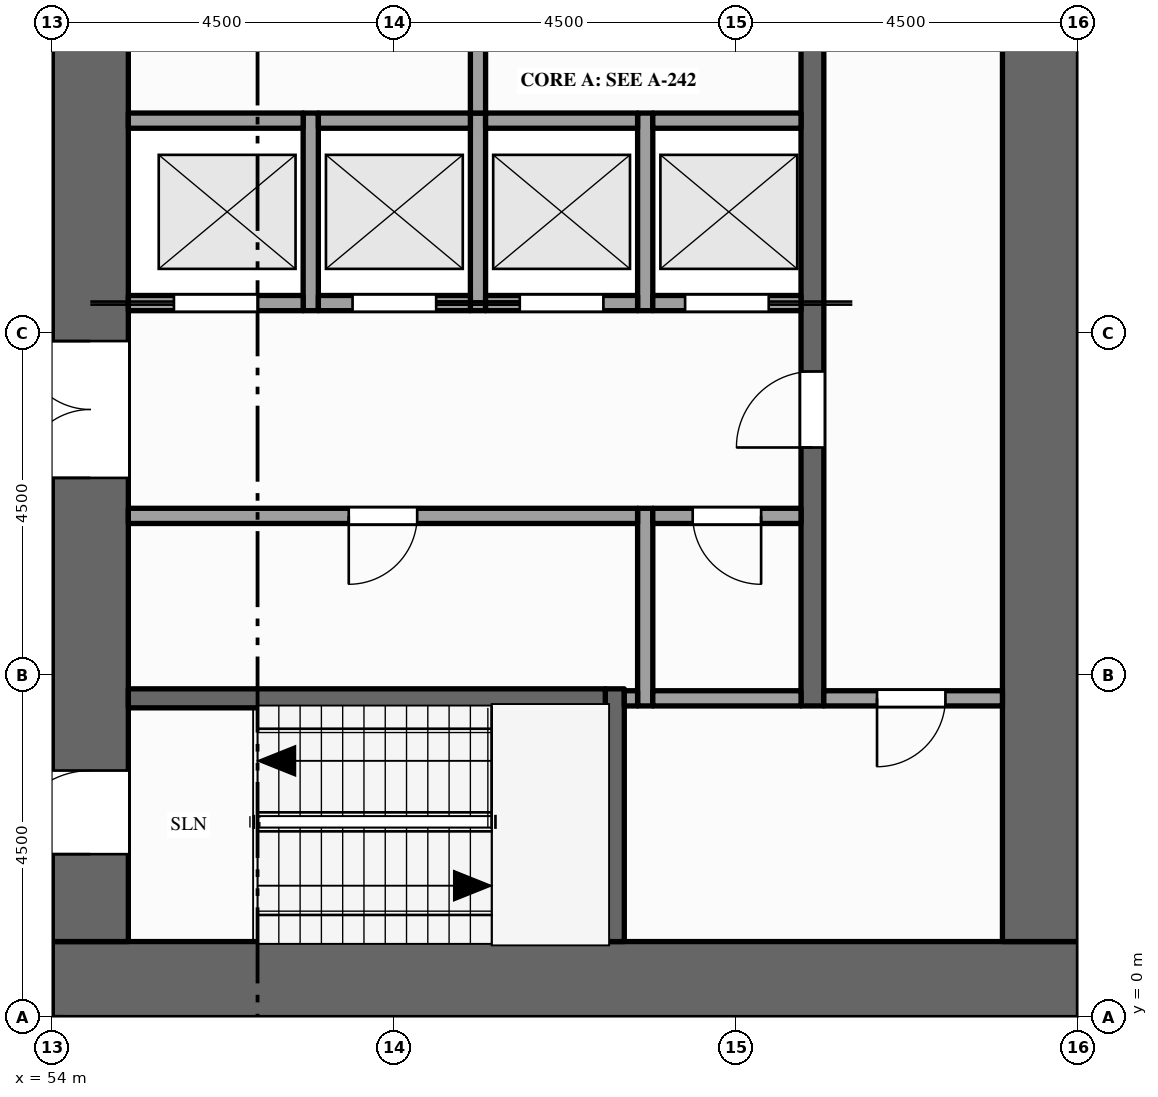
"""IFC4 building model, lengths in metres.
Left out: names, types, materials, properties, quantities, classifications, styles, units other than length and angle.
Written with IfcOpenShell. Run it as: python <this file> out.ifc"""

import sys

from ifc_helpers import new_model, si_unit, direction, frame, frame_2d, origin, place, context, subcontext, project, spatial, rectangle, extrude, element, fill, save


model = new_model("IFC4")
c1 = context("Model", 3, precision=1e-05, world=origin(), true_north=direction((0.0, 1.0)))
c2 = subcontext(c1, "Body", "Model", "MODEL_VIEW")
j1 = project(units=[si_unit("LENGTHUNIT", "METRE"), si_unit("PLANEANGLEUNIT", "RADIAN")], contexts=[c1])
p1 = place(None, origin())
s1 = spatial("IfcSite", under=j1, at=p1, CompositionType="ELEMENT")
p2 = place(p1, origin())
s2 = spatial("IfcBuilding", under=s1, at=p2, CompositionType="ELEMENT")
p3 = place(p2, frame((0.0, 0.0, 235.0)))
s3 = spatial("IfcBuildingStorey", under=s2, at=p3, CompositionType="ELEMENT", Elevation=235.0)
p4 = place(p3, frame((67.5, 0.5, -0.15), z_axis=(0.0, 0.0, 1.0), x_axis=(-1.0, 0.0, 0.0)))
e1 = element("IfcWall", 1, at=p4, inside=s3, PredefinedType="SHEAR", context=c2, shape_type="SweptSolid", body=[
    extrude(rectangle(XDim=13.5, YDim=1.0, at=frame_2d((6.75, 0.0))), origin(), (0.0, 0.0, 1.0), 4.0),
])
p5 = place(p3, frame((54.5, 1.0, -0.15), z_axis=(0.0, 0.0, 1.0), x_axis=(0.0, 1.0, 0.0)))
e2 = element("IfcWall", 2, at=p5, inside=s3, PredefinedType="SHEAR", context=c2, shape_type="SweptSolid", body=[
    extrude(rectangle(XDim=20.5, YDim=1.0, at=frame_2d((10.25, 0.0))), origin(), (0.0, 0.0, 1.0), 4.0),
])
p6 = place(p5, frame((6.1, 0.0, 0.15)))
e3 = element("IfcOpeningElement", 3, at=p6, cuts=e2, PredefinedType="OPENING", context=c2, shape_type="SweptSolid", body=[
    extrude(rectangle(XDim=1.8, YDim=2.1, at=frame_2d((0.9, 1.05))), frame((0.0, 0.51, 0.0), z_axis=(0.0, -1.0, 0.0), x_axis=(1.0, 0.0, 0.0)), (0.0, 0.0, 1.0), 1.02),
])
p7 = place(p5, frame((12.15, 0.0, 0.15)))
e4 = element("IfcOpeningElement", 4, at=p7, cuts=e2, PredefinedType="OPENING", context=c2, shape_type="SweptSolid", body=[
    extrude(rectangle(XDim=1.1, YDim=2.1, at=frame_2d((0.55, 1.05))), frame((0.0, 0.51, 0.0), z_axis=(0.0, -1.0, 0.0), x_axis=(1.0, 0.0, 0.0)), (0.0, 0.0, 1.0), 1.02),
])
p8 = place(p5, frame((1.15, 0.0, 0.15)))
e5 = element("IfcOpeningElement", 5, at=p8, cuts=e2, PredefinedType="OPENING", context=c2, shape_type="SweptSolid", body=[
    extrude(rectangle(XDim=1.1, YDim=2.1, at=frame_2d((0.55, 1.05))), frame((0.0, 0.51, 0.0), z_axis=(0.0, -1.0, 0.0), x_axis=(1.0, 0.0, 0.0)), (0.0, 0.0, 1.0), 1.02),
])
p9 = place(p5, frame((18.35, 0.0, 0.15)))
e6 = element("IfcOpeningElement", 6, at=p9, cuts=e2, PredefinedType="OPENING", context=c2, shape_type="SweptSolid", body=[
    extrude(rectangle(XDim=1.1, YDim=2.1, at=frame_2d((0.55, 1.05))), frame((0.0, 0.51, 0.0), z_axis=(0.0, -1.0, 0.0), x_axis=(1.0, 0.0, 0.0)), (0.0, 0.0, 1.0), 1.02),
])
p10 = place(p3, frame((67.0, 1.0, -0.15), z_axis=(0.0, 0.0, 1.0), x_axis=(0.0, 1.0, 0.0)))
e7 = element("IfcWall", 7, at=p10, inside=s3, PredefinedType="SHEAR", context=c2, shape_type="SweptSolid", body=[
    extrude(rectangle(XDim=20.5, YDim=1.0, at=frame_2d((10.25, 0.0))), origin(), (0.0, 0.0, 1.0), 4.0),
])
for number, where, z_axis, x_axis in (
    (8, (57.4, 9.3, 0.0), (0.0, 0.0, 1.0), (0.0, 1.0, 0.0)),
    (9, (59.6, 9.3, 0.0), (0.0, 0.0, 1.0), (0.0, 1.0, 0.0)),
):
    element("IfcWall", number, at=place(p3, frame(where, z_axis=z_axis, x_axis=x_axis)), inside=s3, PredefinedType="SOLIDWALL", context=c2, shape_type="SweptSolid", body=[
        extrude(rectangle(XDim=2.6, YDim=0.2, at=frame_2d((1.3, 0.0))), origin(), (0.0, 0.0, 1.0), 3.85),
    ])
p11 = place(p3, frame((59.6, 11.9, 0.0), z_axis=(0.0, 0.0, 1.0), x_axis=(0.0, 1.0, 0.0)))
e10 = element("IfcWall", 10, at=p11, inside=s3, PredefinedType="PARTITIONING", context=c2, shape_type="SweptSolid", body=[
    extrude(rectangle(XDim=3.6, YDim=0.2, at=frame_2d((1.8, 0.0))), origin(), (0.0, 0.0, 1.0), 3.85),
])
p12 = place(p11, frame((1.3, 0.0, 0.0)))
e11 = element("IfcOpeningElement", 11, at=p12, cuts=e10, PredefinedType="OPENING", context=c2, shape_type="SweptSolid", body=[
    extrude(rectangle(XDim=1.0, YDim=2.1, at=frame_2d((0.5, 1.05))), frame((0.0, 0.11, 0.0), z_axis=(0.0, -1.0, 0.0), x_axis=(1.0, 0.0, 0.0)), (0.0, 0.0, 1.0), 0.22),
])
p13 = place(p3, frame((61.4, 1.0, 0.0), z_axis=(0.0, 0.0, 1.0), x_axis=(0.0, 1.0, 0.0)))
e12 = element("IfcWall", 12, at=p13, inside=s3, PredefinedType="SHEAR", context=c2, shape_type="SweptSolid", body=[
    extrude(rectangle(XDim=3.325, YDim=0.25, at=frame_2d((1.663, 0.0))), origin(), (0.0, 0.0, 1.0), 3.85),
])
p14 = place(p3, frame((61.8, 4.1, 0.0), z_axis=(0.0, 0.0, 1.0), x_axis=(0.0, 1.0, 0.0)))
e13 = element("IfcWall", 13, at=p14, inside=s3, PredefinedType="PARTITIONING", context=c2, shape_type="SweptSolid", body=[
    extrude(rectangle(XDim=2.6, YDim=0.2, at=frame_2d((1.3, 0.0))), origin(), (0.0, 0.0, 1.0), 3.85),
])
p15 = place(p3, frame((61.8, 9.3, 0.0), z_axis=(0.0, 0.0, 1.0), x_axis=(0.0, 1.0, 0.0)))
e14 = element("IfcWall", 14, at=p15, inside=s3, PredefinedType="SOLIDWALL", context=c2, shape_type="SweptSolid", body=[
    extrude(rectangle(XDim=2.6, YDim=0.2, at=frame_2d((1.3, 0.0))), origin(), (0.0, 0.0, 1.0), 3.85),
])
p16 = place(p3, frame((64.0, 4.1, 0.0), z_axis=(0.0, 0.0, 1.0), x_axis=(0.0, 1.0, 0.0)))
e15 = element("IfcWall", 15, at=p16, inside=s3, PredefinedType="SHEAR", context=c2, shape_type="SweptSolid", body=[
    extrude(rectangle(XDim=14.5, YDim=0.3, at=frame_2d((7.25, 0.0))), origin(), (0.0, 0.0, 1.0), 3.85),
])
p17 = place(p16, frame((3.4, 0.0, 0.0)))
e16 = element("IfcOpeningElement", 16, at=p17, cuts=e15, PredefinedType="OPENING", context=c2, shape_type="SweptSolid", body=[
    extrude(rectangle(XDim=1.0, YDim=2.1, at=frame_2d((0.5, 1.05))), frame((0.0, 0.16, 0.0), z_axis=(0.0, -1.0, 0.0), x_axis=(1.0, 0.0, 0.0)), (0.0, 0.0, 1.0), 0.32),
])
p18 = place(p16, frame((9.1, 0.0, 0.0)))
e17 = element("IfcOpeningElement", 17, at=p18, cuts=e15, PredefinedType="OPENING", context=c2, shape_type="SweptSolid", body=[
    extrude(rectangle(XDim=1.0, YDim=2.1, at=frame_2d((0.5, 1.05))), frame((0.0, 0.16, 0.0), z_axis=(0.0, -1.0, 0.0), x_axis=(1.0, 0.0, 0.0)), (0.0, 0.0, 1.0), 0.32),
])
p19 = place(p3, frame((55.0, 4.2, 0.0), z_axis=(0.0, 0.0, 1.0), x_axis=(1.0, 0.0, 0.0)))
e18 = element("IfcWall", 18, at=p19, inside=s3, PredefinedType="SHEAR", context=c2, shape_type="SweptSolid", body=[
    extrude(rectangle(XDim=6.275, YDim=0.25, at=frame_2d((3.137, 0.0))), origin(), (0.0, 0.0, 1.0), 3.85),
])
p20 = place(p3, frame((61.525, 4.2, 0.0), z_axis=(0.0, 0.0, 1.0), x_axis=(1.0, 0.0, 0.0)))
e19 = element("IfcWall", 19, at=p20, inside=s3, PredefinedType="PARTITIONING", context=c2, shape_type="SweptSolid", body=[
    extrude(rectangle(XDim=0.175, YDim=0.2, at=frame_2d((0.087, 0.0))), origin(), (0.0, 0.0, 1.0), 3.85),
])
p21 = place(p3, frame((61.9, 4.2, 0.0), z_axis=(0.0, 0.0, 1.0), x_axis=(1.0, 0.0, 0.0)))
e20 = element("IfcWall", 20, at=p21, inside=s3, PredefinedType="PARTITIONING", context=c2, shape_type="SweptSolid", body=[
    extrude(rectangle(XDim=1.95, YDim=0.2, at=frame_2d((0.975, 0.0))), origin(), (0.0, 0.0, 1.0), 3.85),
])
p22 = place(p3, frame((64.15, 4.2, 0.0), z_axis=(0.0, 0.0, 1.0), x_axis=(1.0, 0.0, 0.0)))
e21 = element("IfcWall", 21, at=p22, inside=s3, PredefinedType="PARTITIONING", context=c2, shape_type="SweptSolid", body=[
    extrude(rectangle(XDim=2.35, YDim=0.2, at=frame_2d((1.175, 0.0))), origin(), (0.0, 0.0, 1.0), 3.85),
])
p23 = place(p22, frame((0.7, 0.0, 0.0)))
e22 = element("IfcOpeningElement", 22, at=p23, cuts=e21, PredefinedType="OPENING", context=c2, shape_type="SweptSolid", body=[
    extrude(rectangle(XDim=0.9, YDim=2.1, at=frame_2d((0.45, 1.05))), frame((0.0, 0.11, 0.0), z_axis=(0.0, -1.0, 0.0), x_axis=(1.0, 0.0, 0.0)), (0.0, 0.0, 1.0), 0.22),
])
p24 = place(p3, frame((55.0, 6.6, 0.0), z_axis=(0.0, 0.0, 1.0), x_axis=(1.0, 0.0, 0.0)))
e23 = element("IfcWall", 23, at=p24, inside=s3, PredefinedType="PARTITIONING", context=c2, shape_type="SweptSolid", body=[
    extrude(rectangle(XDim=6.7, YDim=0.2, at=frame_2d((3.35, 0.0))), origin(), (0.0, 0.0, 1.0), 3.85),
])
p25 = place(p24, frame((2.9, 0.0, 0.0)))
e24 = element("IfcOpeningElement", 24, at=p25, cuts=e23, PredefinedType="OPENING", context=c2, shape_type="SweptSolid", body=[
    extrude(rectangle(XDim=0.9, YDim=2.1, at=frame_2d((0.45, 1.05))), frame((0.0, 0.11, 0.0), z_axis=(0.0, -1.0, 0.0), x_axis=(1.0, 0.0, 0.0)), (0.0, 0.0, 1.0), 0.22),
])
p26 = place(p3, frame((61.9, 6.6, 0.0), z_axis=(0.0, 0.0, 1.0), x_axis=(1.0, 0.0, 0.0)))
e25 = element("IfcWall", 25, at=p26, inside=s3, PredefinedType="PARTITIONING", context=c2, shape_type="SweptSolid", body=[
    extrude(rectangle(XDim=1.95, YDim=0.2, at=frame_2d((0.975, 0.0))), origin(), (0.0, 0.0, 1.0), 3.85),
])
p27 = place(p26, frame((0.525, 0.0, 0.0)))
e26 = element("IfcOpeningElement", 26, at=p27, cuts=e25, PredefinedType="OPENING", context=c2, shape_type="SweptSolid", body=[
    extrude(rectangle(XDim=0.9, YDim=2.1, at=frame_2d((0.45, 1.05))), frame((0.0, 0.11, 0.0), z_axis=(0.0, -1.0, 0.0), x_axis=(1.0, 0.0, 0.0)), (0.0, 0.0, 1.0), 0.22),
])
p28 = place(p3, frame((55.0, 9.4, 0.0), z_axis=(0.0, 0.0, 1.0), x_axis=(1.0, 0.0, 0.0)))
e27 = element("IfcWall", 27, at=p28, inside=s3, PredefinedType="SOLIDWALL", context=c2, shape_type="SweptSolid", body=[
    extrude(rectangle(XDim=2.3, YDim=0.2, at=frame_2d((1.15, 0.0))), origin(), (0.0, 0.0, 1.0), 3.85),
])
p29 = place(p28, frame((0.6, 0.0, 0.012)))
e28 = element("IfcOpeningElement", 28, at=p29, cuts=e27, PredefinedType="OPENING", context=c2, shape_type="SweptSolid", body=[
    extrude(rectangle(XDim=1.1, YDim=2.1, at=frame_2d((0.55, 1.05))), frame((0.0, 0.11, 0.0), z_axis=(0.0, -1.0, 0.0), x_axis=(1.0, 0.0, 0.0)), (0.0, 0.0, 1.0), 0.22),
])
p30 = place(p3, frame((57.5, 9.4, 0.0), z_axis=(0.0, 0.0, 1.0), x_axis=(1.0, 0.0, 0.0)))
e29 = element("IfcWall", 29, at=p30, inside=s3, PredefinedType="SOLIDWALL", context=c2, shape_type="SweptSolid", body=[
    extrude(rectangle(XDim=2.0, YDim=0.2, at=frame_2d((1.0, 0.0))), origin(), (0.0, 0.0, 1.0), 3.85),
])
p31 = place(p30, frame((0.45, 0.0, 0.012)))
e30 = element("IfcOpeningElement", 30, at=p31, cuts=e29, PredefinedType="OPENING", context=c2, shape_type="SweptSolid", body=[
    extrude(rectangle(XDim=1.1, YDim=2.1, at=frame_2d((0.55, 1.05))), frame((0.0, 0.11, 0.0), z_axis=(0.0, -1.0, 0.0), x_axis=(1.0, 0.0, 0.0)), (0.0, 0.0, 1.0), 0.22),
])
p32 = place(p3, frame((59.7, 9.4, 0.0), z_axis=(0.0, 0.0, 1.0), x_axis=(1.0, 0.0, 0.0)))
e31 = element("IfcWall", 31, at=p32, inside=s3, PredefinedType="SOLIDWALL", context=c2, shape_type="SweptSolid", body=[
    extrude(rectangle(XDim=2.0, YDim=0.2, at=frame_2d((1.0, 0.0))), origin(), (0.0, 0.0, 1.0), 3.85),
])
p33 = place(p32, frame((0.45, 0.0, 0.012)))
e32 = element("IfcOpeningElement", 32, at=p33, cuts=e31, PredefinedType="OPENING", context=c2, shape_type="SweptSolid", body=[
    extrude(rectangle(XDim=1.1, YDim=2.1, at=frame_2d((0.55, 1.05))), frame((0.0, 0.11, 0.0), z_axis=(0.0, -1.0, 0.0), x_axis=(1.0, 0.0, 0.0)), (0.0, 0.0, 1.0), 0.22),
])
p34 = place(p3, frame((61.9, 9.4, 0.0), z_axis=(0.0, 0.0, 1.0), x_axis=(1.0, 0.0, 0.0)))
e33 = element("IfcWall", 33, at=p34, inside=s3, PredefinedType="SOLIDWALL", context=c2, shape_type="SweptSolid", body=[
    extrude(rectangle(XDim=1.95, YDim=0.2, at=frame_2d((0.975, 0.0))), origin(), (0.0, 0.0, 1.0), 3.85),
])
p35 = place(p34, frame((0.425, 0.0, 0.012)))
e34 = element("IfcOpeningElement", 34, at=p35, cuts=e33, PredefinedType="OPENING", context=c2, shape_type="SweptSolid", body=[
    extrude(rectangle(XDim=1.1, YDim=2.1, at=frame_2d((0.55, 1.05))), frame((0.0, 0.11, 0.0), z_axis=(0.0, -1.0, 0.0), x_axis=(1.0, 0.0, 0.0)), (0.0, 0.0, 1.0), 0.22),
])
p36 = place(p3, frame((55.0, 11.8, 0.0), z_axis=(0.0, 0.0, 1.0), x_axis=(1.0, 0.0, 0.0)))
e35 = element("IfcWall", 35, at=p36, inside=s3, PredefinedType="SOLIDWALL", context=c2, shape_type="SweptSolid", body=[
    extrude(rectangle(XDim=2.3, YDim=0.2, at=frame_2d((1.15, 0.0))), origin(), (0.0, 0.0, 1.0), 3.85),
])
for number, where, z_axis, x_axis in (
    (36, (57.5, 11.8, 0.0), (0.0, 0.0, 1.0), (1.0, 0.0, 0.0)),
    (37, (59.7, 11.8, 0.0), (0.0, 0.0, 1.0), (1.0, 0.0, 0.0)),
):
    element("IfcWall", number, at=place(p3, frame(where, z_axis=z_axis, x_axis=x_axis)), inside=s3, PredefinedType="SOLIDWALL", context=c2, shape_type="SweptSolid", body=[
        extrude(rectangle(XDim=2.0, YDim=0.2, at=frame_2d((1.0, 0.0))), origin(), (0.0, 0.0, 1.0), 3.85),
    ])
p37 = place(p3, frame((61.9, 11.8, 0.0), z_axis=(0.0, 0.0, 1.0), x_axis=(1.0, 0.0, 0.0)))
e38 = element("IfcWall", 38, at=p37, inside=s3, PredefinedType="SOLIDWALL", context=c2, shape_type="SweptSolid", body=[
    extrude(rectangle(XDim=1.95, YDim=0.2, at=frame_2d((0.975, 0.0))), origin(), (0.0, 0.0, 1.0), 3.85),
])
p38 = place(p29, origin())
e39 = element("IfcDoor", 39, at=p38, inside=s3, OperationType="SLIDING_TO_LEFT", PredefinedType="DOOR", context=c2, shape_type="SweptSolid", body=[
    extrude(rectangle(XDim=1.1, YDim=2.1, at=frame_2d((0.55, 1.05))), frame((0.0, 0.025, 0.0), z_axis=(0.0, -1.0, 0.0), x_axis=(1.0, 0.0, 0.0)), (0.0, 0.0, 1.0), 0.05),
])
fill(e28, e39)
p39 = place(p31, origin())
e40 = element("IfcDoor", 40, at=p39, inside=s3, OperationType="SLIDING_TO_RIGHT", PredefinedType="DOOR", context=c2, shape_type="SweptSolid", body=[
    extrude(rectangle(XDim=1.1, YDim=2.1, at=frame_2d((0.55, 1.05))), frame((0.0, 0.025, 0.0), z_axis=(0.0, -1.0, 0.0), x_axis=(1.0, 0.0, 0.0)), (0.0, 0.0, 1.0), 0.05),
])
fill(e30, e40)
p40 = place(p33, origin())
e41 = element("IfcDoor", 41, at=p40, inside=s3, OperationType="SLIDING_TO_LEFT", PredefinedType="DOOR", context=c2, shape_type="SweptSolid", body=[
    extrude(rectangle(XDim=1.1, YDim=2.1, at=frame_2d((0.55, 1.05))), frame((0.0, 0.025, 0.0), z_axis=(0.0, -1.0, 0.0), x_axis=(1.0, 0.0, 0.0)), (0.0, 0.0, 1.0), 0.05),
])
fill(e32, e41)
p41 = place(p35, origin())
e42 = element("IfcDoor", 42, at=p41, inside=s3, OperationType="SLIDING_TO_RIGHT", PredefinedType="DOOR", context=c2, shape_type="SweptSolid", body=[
    extrude(rectangle(XDim=1.1, YDim=2.1, at=frame_2d((0.55, 1.05))), frame((0.0, 0.025, 0.0), z_axis=(0.0, -1.0, 0.0), x_axis=(1.0, 0.0, 0.0)), (0.0, 0.0, 1.0), 0.05),
])
fill(e34, e42)
p42 = place(p6, origin())
e43 = element("IfcDoor", 43, at=p42, inside=s3, OperationType="DOUBLE_DOOR_SINGLE_SWING", PredefinedType="DOOR", context=c2, shape_type="SweptSolid", body=[
    extrude(rectangle(XDim=1.8, YDim=2.1, at=frame_2d((0.9, 1.05))), frame((0.0, 0.025, 0.0), z_axis=(0.0, -1.0, 0.0), x_axis=(1.0, 0.0, 0.0)), (0.0, 0.0, 1.0), 0.05),
])
fill(e3, e43)
p43 = place(p17, origin())
e44 = element("IfcDoor", 44, at=p43, inside=s3, OperationType="SINGLE_SWING_LEFT", PredefinedType="DOOR", context=c2, shape_type="SweptSolid", body=[
    extrude(rectangle(XDim=1.0, YDim=2.1, at=frame_2d((0.5, 1.05))), frame((0.0, 0.025, 0.0), z_axis=(0.0, -1.0, 0.0), x_axis=(1.0, 0.0, 0.0)), (0.0, 0.0, 1.0), 0.05),
])
fill(e16, e44)
p44 = place(p8, origin())
e45 = element("IfcDoor", 45, at=p44, inside=s3, OperationType="SINGLE_SWING_LEFT", PredefinedType="DOOR", context=c2, shape_type="SweptSolid", body=[
    extrude(rectangle(XDim=1.1, YDim=2.1, at=frame_2d((0.55, 1.05))), frame((0.0, 0.025, 0.0), z_axis=(0.0, -1.0, 0.0), x_axis=(1.0, 0.0, 0.0)), (0.0, 0.0, 1.0), 0.05),
])
fill(e5, e45)
p45 = place(p23, origin())
e46 = element("IfcDoor", 46, at=p45, inside=s3, OperationType="SINGLE_SWING_LEFT", PredefinedType="DOOR", context=c2, shape_type="SweptSolid", body=[
    extrude(rectangle(XDim=0.9, YDim=2.1, at=frame_2d((0.45, 1.05))), frame((0.0, 0.025, 0.0), z_axis=(0.0, -1.0, 0.0), x_axis=(1.0, 0.0, 0.0)), (0.0, 0.0, 1.0), 0.05),
])
fill(e22, e46)
p46 = place(p25, origin())
e47 = element("IfcDoor", 47, at=p46, inside=s3, OperationType="SINGLE_SWING_LEFT", PredefinedType="DOOR", context=c2, shape_type="SweptSolid", body=[
    extrude(rectangle(XDim=0.9, YDim=2.1, at=frame_2d((0.45, 1.05))), frame((0.0, 0.025, 0.0), z_axis=(0.0, -1.0, 0.0), x_axis=(1.0, 0.0, 0.0)), (0.0, 0.0, 1.0), 0.05),
])
fill(e24, e47)
p47 = place(p27, origin())
e48 = element("IfcDoor", 48, at=p47, inside=s3, OperationType="SINGLE_SWING_RIGHT", PredefinedType="DOOR", context=c2, shape_type="SweptSolid", body=[
    extrude(rectangle(XDim=0.9, YDim=2.1, at=frame_2d((0.45, 1.05))), frame((0.0, 0.025, 0.0), z_axis=(0.0, -1.0, 0.0), x_axis=(1.0, 0.0, 0.0)), (0.0, 0.0, 1.0), 0.05),
])
fill(e26, e48)
save(model, sys.argv[1])
